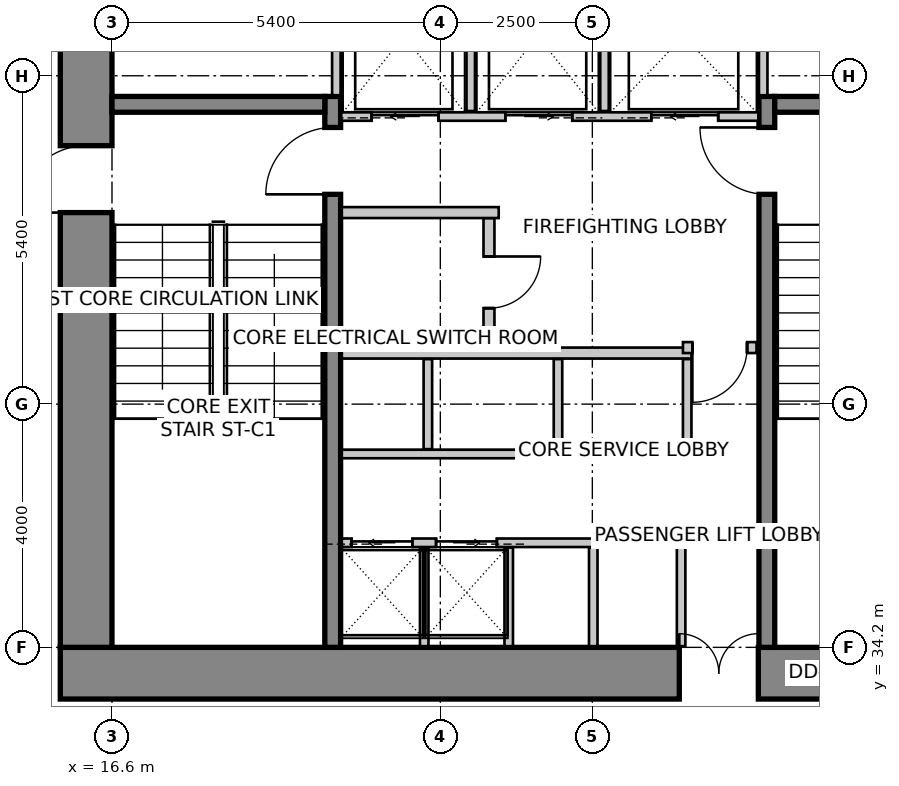
"""IFC4 building model, lengths in metres.
Left out: names, types, materials, properties, quantities, classifications, styles, units other than length and angle.
Written with IfcOpenShell. Run it as: python <this file> out.ifc"""

import sys

from ifc_helpers import new_model, si_unit, direction, frame, frame_2d, origin, place, context, subcontext, project, spatial, rectangle, extrude, source, transform, mapped, element, fill, save


model = new_model("IFC4")
c1 = context("Model", 3, precision=1e-05, world=origin(), true_north=direction((0.0, 1.0)))
c2 = subcontext(c1, "Body", "Model", "MODEL_VIEW")
j1 = project(units=[si_unit("LENGTHUNIT", "METRE"), si_unit("PLANEANGLEUNIT", "RADIAN")], contexts=[c1])
p1 = place(None, origin())
s1 = spatial("IfcSite", under=j1, at=p1, CompositionType="ELEMENT")
p2 = place(p1, origin())
s2 = spatial("IfcBuilding", under=s1, at=p2, CompositionType="ELEMENT")
p3 = place(p2, frame((0.0, 0.0, 39.0)))
s3 = spatial("IfcBuildingStorey", under=s2, at=p3, CompositionType="ELEMENT", Elevation=39.0)
p4 = place(p3, frame((15.75, 33.775, 0.0), z_axis=(0.0, 0.0, 1.0), x_axis=(1.0, 0.0, 0.0)))
e1 = element("IfcWall", 1, at=p4, inside=s3, PredefinedType="SHEAR", context=c2, shape_type="SweptSolid", body=[
    extrude(rectangle(XDim=16.1, YDim=0.85, at=frame_2d((8.05, 0.0))), origin(), (0.0, 0.0, 1.0), 4.0),
])
m1 = source(origin(), c2, "Body", "SweptSolid", [
    extrude(rectangle(XDim=1.3, YDim=2.15, at=frame_2d((0.65, 1.075))), frame((0.0, 0.435, 0.0), z_axis=(0.0, -1.0, 0.0), x_axis=(1.0, 0.0, 0.0)), (0.0, 0.0, 1.0), 0.87),
])
p5 = place(p4, frame((10.18, 0.0, 0.0)))
e2 = element("IfcOpeningElement", 2, at=p5, cuts=e1, PredefinedType="OPENING", context=c2, shape_type="MappedRepresentation", body=[
    mapped(m1, transform((0.0, 0.0, 0.0), scale=1.0)),
])
p6 = place(p3, frame((16.175, 34.2, 0.0), z_axis=(0.0, 0.0, 1.0), x_axis=(0.0, 1.0, 0.0)))
e3 = element("IfcWall", 3, at=p6, inside=s3, PredefinedType="SHEAR", context=c2, shape_type="SweptSolid", body=[
    extrude(rectangle(XDim=11.4, YDim=0.85, at=frame_2d((5.7, 0.0))), origin(), (0.0, 0.0, 1.0), 4.0),
])
m2 = source(origin(), c2, "Body", "SweptSolid", [
    extrude(rectangle(XDim=1.1, YDim=2.15, at=frame_2d((0.55, 1.075))), frame((0.0, 0.435, 0.0), z_axis=(0.0, -1.0, 0.0), x_axis=(1.0, 0.0, 0.0)), (0.0, 0.0, 1.0), 0.87),
])
p7 = place(p6, frame((7.15, 0.0, 0.0)))
e4 = element("IfcOpeningElement", 4, at=p7, cuts=e3, PredefinedType="OPENING", context=c2, shape_type="MappedRepresentation", body=[
    mapped(m2, transform((0.0, 0.0, 0.0), scale=1.0)),
])
p8 = place(p3, frame((20.23, 34.2, 0.0), z_axis=(0.0, 0.0, 1.0), x_axis=(0.0, 1.0, 0.0)))
e5 = element("IfcWall", 5, at=p8, inside=s3, PredefinedType="SHEAR", context=c2, shape_type="SweptSolid", body=[
    extrude(rectangle(XDim=9.06, YDim=0.26, at=frame_2d((4.53, 0.0))), origin(), (0.0, 0.0, 1.0), 4.0),
])
m3 = source(origin(), c2, "Body", "SweptSolid", [
    extrude(rectangle(XDim=1.1, YDim=2.15, at=frame_2d((0.55, 1.075))), frame((0.0, 0.14, 0.0), z_axis=(0.0, -1.0, 0.0), x_axis=(1.0, 0.0, 0.0)), (0.0, 0.0, 1.0), 0.28),
])
p9 = place(p8, frame((7.45, 0.0, 0.0)))
e6 = element("IfcOpeningElement", 6, at=p9, cuts=e5, PredefinedType="OPENING", context=c2, shape_type="MappedRepresentation", body=[
    mapped(m3, transform((0.0, 0.0, 0.0), scale=1.0)),
])
p10 = place(p3, frame((27.37, 34.2, 0.0), z_axis=(0.0, 0.0, 1.0), x_axis=(0.0, 1.0, 0.0)))
e7 = element("IfcWall", 7, at=p10, inside=s3, PredefinedType="SHEAR", context=c2, shape_type="SweptSolid", body=[
    extrude(rectangle(XDim=9.06, YDim=0.26, at=frame_2d((4.53, 0.0))), origin(), (0.0, 0.0, 1.0), 4.0),
])
p11 = place(p10, frame((7.45, 0.0, 0.0)))
e8 = element("IfcOpeningElement", 8, at=p11, cuts=e7, PredefinedType="OPENING", context=c2, shape_type="MappedRepresentation", body=[
    mapped(m3, transform((0.0, 0.0, 0.0), scale=1.0)),
])
for number, where, z_axis, x_axis in (
    (9, (16.6, 43.13, 0.0), (0.0, 0.0, 1.0), (1.0, 0.0, 0.0)),
    (10, (27.5, 43.13, 0.0), (0.0, 0.0, 1.0), (1.0, 0.0, 0.0)),
):
    element("IfcWall", number, at=place(p3, frame(where, z_axis=z_axis, x_axis=x_axis)), inside=s3, PredefinedType="SHEAR", context=c2, shape_type="SweptSolid", body=[
        extrude(rectangle(XDim=3.5, YDim=0.26, at=frame_2d((1.75, 0.0))), origin(), (0.0, 0.0, 1.0), 4.0),
    ])
p12 = place(p3, frame((20.37, 42.93, 0.0), z_axis=(0.0, 0.0, 1.0), x_axis=(1.0, 0.0, 0.0)))
e11 = element("IfcWall", 11, at=p12, inside=s3, PredefinedType="SOLIDWALL", context=c2, shape_type="SweptSolid", body=[
    extrude(rectangle(XDim=6.86, YDim=0.14, at=frame_2d((3.43, 0.0))), origin(), (0.0, 0.0, 1.0), 3.75),
])
m4 = source(origin(), c2, "Body", "SweptSolid", [
    extrude(rectangle(XDim=1.1, YDim=2.15, at=frame_2d((0.55, 1.075))), frame((0.0, 0.08, 0.0), z_axis=(0.0, -1.0, 0.0), x_axis=(1.0, 0.0, 0.0)), (0.0, 0.0, 1.0), 0.16),
])
p13 = place(p12, frame((0.5, 0.0, 0.0)))
e12 = element("IfcOpeningElement", 12, at=p13, cuts=e11, PredefinedType="OPENING", context=c2, shape_type="MappedRepresentation", body=[
    mapped(m4, transform((0.0, 0.0, 0.0), scale=1.0)),
])
p14 = place(p12, frame((2.7, 0.0, 0.0)))
e13 = element("IfcOpeningElement", 13, at=p14, cuts=e11, PredefinedType="OPENING", context=c2, shape_type="MappedRepresentation", body=[
    mapped(m4, transform((0.0, 0.0, 0.0), scale=1.0)),
])
p15 = place(p12, frame((5.1, 0.0, 0.0)))
e14 = element("IfcOpeningElement", 14, at=p15, cuts=e11, PredefinedType="OPENING", context=c2, shape_type="MappedRepresentation", body=[
    mapped(m4, transform((0.0, 0.0, 0.0), scale=1.0)),
])
for number, where, z_axis, x_axis in (
    (15, (20.29, 43.28, 0.0), (0.0, 0.0, 1.0), (0.0, 1.0, 0.0)),
    (16, (27.31, 43.28, 0.0), (0.0, 0.0, 1.0), (0.0, 1.0, 0.0)),
):
    element("IfcWall", number, at=place(p3, frame(where, z_axis=z_axis, x_axis=x_axis)), inside=s3, PredefinedType="SOLIDWALL", context=c2, shape_type="SweptSolid", body=[
        extrude(rectangle(XDim=2.3, YDim=0.14, at=frame_2d((1.15, 0.0))), origin(), (0.0, 0.0, 1.0), 3.75),
    ])
for number, where, z_axis, x_axis in (
    (17, (22.5, 43.02, 0.0), (0.0, 0.0, 1.0), (0.0, 1.0, 0.0)),
    (18, (24.7, 43.02, 0.0), (0.0, 0.0, 1.0), (0.0, 1.0, 0.0)),
):
    element("IfcWall", number, at=place(p3, frame(where, z_axis=z_axis, x_axis=x_axis)), inside=s3, PredefinedType="SOLIDWALL", context=c2, shape_type="SweptSolid", body=[
        extrude(rectangle(XDim=2.56, YDim=0.14, at=frame_2d((1.28, 0.0))), origin(), (0.0, 0.0, 1.0), 3.75),
    ])
p16 = place(p3, frame((20.38, 35.92, 0.0), z_axis=(0.0, 0.0, 1.0), x_axis=(1.0, 0.0, 0.0)))
e19 = element("IfcWall", 19, at=p16, inside=s3, PredefinedType="SOLIDWALL", context=c2, shape_type="SweptSolid", body=[
    extrude(rectangle(XDim=5.65, YDim=0.14, at=frame_2d((2.825, 0.0))), origin(), (0.0, 0.0, 1.0), 3.75),
])
m5 = source(origin(), c2, "Body", "SweptSolid", [
    extrude(rectangle(XDim=1.0, YDim=2.15, at=frame_2d((0.5, 1.075))), frame((0.0, 0.08, 0.0), z_axis=(0.0, -1.0, 0.0), x_axis=(1.0, 0.0, 0.0)), (0.0, 0.0, 1.0), 0.16),
])
p17 = place(p16, frame((0.16, 0.0, 0.0)))
e20 = element("IfcOpeningElement", 20, at=p17, cuts=e19, PredefinedType="OPENING", context=c2, shape_type="MappedRepresentation", body=[
    mapped(m5, transform((0.0, 0.0, 0.0), scale=1.0)),
])
p18 = place(p16, frame((1.55, 0.0, 0.0)))
e21 = element("IfcOpeningElement", 21, at=p18, cuts=e19, PredefinedType="OPENING", context=c2, shape_type="MappedRepresentation", body=[
    mapped(m5, transform((0.0, 0.0, 0.0), scale=1.0)),
])
for number, where, z_axis, x_axis in (
    (22, (25.96, 34.22, 0.0), (0.0, 0.0, 1.0), (0.0, 1.0, 0.0)),
    (23, (21.735, 34.22, 0.0), (0.0, 0.0, 1.0), (0.0, 1.0, 0.0)),
    (24, (23.125, 34.22, 0.0), (0.0, 0.0, 1.0), (0.0, 1.0, 0.0)),
    (25, (24.515, 34.22, 0.0), (0.0, 0.0, 1.0), (0.0, 1.0, 0.0)),
):
    element("IfcWall", number, at=place(p3, frame(where, z_axis=z_axis, x_axis=x_axis)), inside=s3, PredefinedType="SOLIDWALL", context=c2, shape_type="SweptSolid", body=[
        extrude(rectangle(XDim=1.62, YDim=0.14, at=frame_2d((0.81, 0.0))), origin(), (0.0, 0.0, 1.0), 3.042),
    ])
p19 = place(p3, frame((20.38, 37.38, 0.0), z_axis=(0.0, 0.0, 1.0), x_axis=(1.0, 0.0, 0.0)))
e26 = element("IfcWall", 26, at=p19, inside=s3, PredefinedType="SOLIDWALL", context=c2, shape_type="SweptSolid", body=[
    extrude(rectangle(XDim=5.75, YDim=0.14, at=frame_2d((2.875, 0.0))), origin(), (0.0, 0.0, 1.0), 3.75),
])
p20 = place(p3, frame((20.38, 39.04, 0.0), z_axis=(0.0, 0.0, 1.0), x_axis=(1.0, 0.0, 0.0)))
e27 = element("IfcWall", 27, at=p20, inside=s3, PredefinedType="SOLIDWALL", context=c2, shape_type="SweptSolid", body=[
    extrude(rectangle(XDim=5.75, YDim=0.18, at=frame_2d((2.875, 0.0))), origin(), (0.0, 0.0, 1.0), 3.75),
])
for number, where, z_axis, x_axis in (
    (28, (26.06, 37.46, 0.0), (0.0, 0.0, 1.0), (0.0, 1.0, 0.0)),
    (29, (21.795, 37.46, 0.0), (0.0, 0.0, 1.0), (0.0, 1.0, 0.0)),
    (30, (23.935, 37.46, 0.0), (0.0, 0.0, 1.0), (0.0, 1.0, 0.0)),
):
    element("IfcWall", number, at=place(p3, frame(where, z_axis=z_axis, x_axis=x_axis)), inside=s3, PredefinedType="SOLIDWALL", context=c2, shape_type="SweptSolid", body=[
        extrude(rectangle(XDim=1.48, YDim=0.14, at=frame_2d((0.74, 0.0))), origin(), (0.0, 0.0, 1.0), 3.75),
    ])
p21 = place(p3, frame((22.96, 41.35, 0.0), z_axis=(0.0, 0.0, 1.0), x_axis=(-1.0, 0.0, 0.0)))
e31 = element("IfcWall", 31, at=p21, inside=s3, PredefinedType="PARTITIONING", context=c2, shape_type="SweptSolid", body=[
    extrude(rectangle(XDim=2.58, YDim=0.18, at=frame_2d((1.29, 0.0))), origin(), (0.0, 0.0, 1.0), 3.75),
])
p22 = place(p3, frame((22.8, 41.256, 0.0), z_axis=(0.0, 0.0, 1.0), x_axis=(0.0, -1.0, 0.0)))
e32 = element("IfcWall", 32, at=p22, inside=s3, PredefinedType="PARTITIONING", context=c2, shape_type="SweptSolid", body=[
    extrude(rectangle(XDim=2.106, YDim=0.18, at=frame_2d((1.053, 0.0))), origin(), (0.0, 0.0, 1.0), 3.75),
])
m6 = source(origin(), c2, "Body", "SweptSolid", [
    extrude(rectangle(XDim=0.85, YDim=2.15, at=frame_2d((0.425, 1.075))), frame((0.0, 0.1, 0.0), z_axis=(0.0, -1.0, 0.0), x_axis=(1.0, 0.0, 0.0)), (0.0, 0.0, 1.0), 0.2),
])
p23 = place(p22, frame((0.628, 0.0, 0.0)))
e33 = element("IfcOpeningElement", 33, at=p23, cuts=e32, PredefinedType="OPENING", context=c2, shape_type="MappedRepresentation", body=[
    mapped(m6, transform((0.0, 0.0, 0.0), scale=1.0)),
])
p24 = place(p3, frame((27.2, 39.13, 0.0), z_axis=(0.0, 0.0, 1.0), x_axis=(-1.0, 0.0, 0.0)))
e34 = element("IfcWall", 34, at=p24, inside=s3, PredefinedType="PARTITIONING", context=c2, shape_type="SweptSolid", body=[
    extrude(rectangle(XDim=1.21, YDim=0.18, at=frame_2d((0.605, 0.0))), origin(), (0.0, 0.0, 1.0), 3.75),
])
m7 = source(origin(), c2, "Body", "SweptSolid", [
    extrude(rectangle(XDim=0.9, YDim=2.15, at=frame_2d((0.45, 1.075))), frame((0.0, 0.1, 0.0), z_axis=(0.0, -1.0, 0.0), x_axis=(1.0, 0.0, 0.0)), (0.0, 0.0, 1.0), 0.2),
])
p25 = place(p24, frame((0.155, 0.0, 0.0)))
e35 = element("IfcOpeningElement", 35, at=p25, cuts=e34, PredefinedType="OPENING", context=c2, shape_type="MappedRepresentation", body=[
    mapped(m7, transform((0.0, 0.0, 0.0), scale=1.0)),
])
m8 = source(origin(), c2, "Body", "SweptSolid", [
    extrude(rectangle(XDim=1.1, YDim=2.15, at=frame_2d((0.55, 1.075))), frame((0.0, 0.025, 0.0), z_axis=(0.0, -1.0, 0.0), x_axis=(1.0, 0.0, 0.0)), (0.0, 0.0, 1.0), 0.05),
])
p26 = place(p13, origin())
e36 = element("IfcDoor", 36, at=p26, inside=s3, OperationType="SLIDING_TO_LEFT", PredefinedType="DOOR", context=c2, shape_type="MappedRepresentation", body=[
    mapped(m8, transform((0.0, 0.0, 0.0), scale=1.0)),
])
fill(e12, e36)
p27 = place(p14, origin())
e37 = element("IfcDoor", 37, at=p27, inside=s3, OperationType="SLIDING_TO_RIGHT", PredefinedType="DOOR", context=c2, shape_type="MappedRepresentation", body=[
    mapped(m8, transform((0.0, 0.0, 0.0), scale=1.0)),
])
fill(e13, e37)
m9 = source(origin(), c2, "Body", "SweptSolid", [
    extrude(rectangle(XDim=1.1, YDim=2.15, at=frame_2d((0.55, 1.075))), frame((0.0, 0.025, 0.0), z_axis=(0.0, -1.0, 0.0), x_axis=(1.0, 0.0, 0.0)), (0.0, 0.0, 1.0), 0.05),
])
p28 = place(p15, origin())
e38 = element("IfcDoor", 38, at=p28, inside=s3, OperationType="SLIDING_TO_LEFT", PredefinedType="DOOR", context=c2, shape_type="MappedRepresentation", body=[
    mapped(m9, transform((0.0, 0.0, 0.0), scale=1.0)),
])
fill(e14, e38)
m10 = source(origin(), c2, "Body", "SweptSolid", [
    extrude(rectangle(XDim=1.0, YDim=2.15, at=frame_2d((0.5, 1.075))), frame((0.0, 0.025, 0.0), z_axis=(0.0, -1.0, 0.0), x_axis=(1.0, 0.0, 0.0)), (0.0, 0.0, 1.0), 0.05),
])
p29 = place(p17, origin())
e39 = element("IfcDoor", 39, at=p29, inside=s3, OperationType="SLIDING_TO_LEFT", PredefinedType="DOOR", context=c2, shape_type="MappedRepresentation", body=[
    mapped(m10, transform((0.0, 0.0, 0.0), scale=1.0)),
])
fill(e20, e39)
p30 = place(p18, origin())
e40 = element("IfcDoor", 40, at=p30, inside=s3, OperationType="SLIDING_TO_RIGHT", PredefinedType="DOOR", context=c2, shape_type="MappedRepresentation", body=[
    mapped(m10, transform((0.0, 0.0, 0.0), scale=1.0)),
])
fill(e21, e40)
m11 = source(origin(), c2, "Body", "SweptSolid", [
    extrude(rectangle(XDim=1.1, YDim=2.15, at=frame_2d((0.55, 1.075))), frame((0.0, 0.025, 0.0), z_axis=(0.0, -1.0, 0.0), x_axis=(1.0, 0.0, 0.0)), (0.0, 0.0, 1.0), 0.05),
])
p31 = place(p9, origin())
e41 = element("IfcDoor", 41, at=p31, inside=s3, OperationType="SINGLE_SWING_LEFT", PredefinedType="DOOR", context=c2, shape_type="MappedRepresentation", body=[
    mapped(m11, transform((0.0, 0.0, 0.0), scale=1.0)),
])
fill(e6, e41)
p32 = place(p11, origin())
e42 = element("IfcDoor", 42, at=p32, inside=s3, OperationType="SINGLE_SWING_RIGHT", PredefinedType="DOOR", context=c2, shape_type="MappedRepresentation", body=[
    mapped(m11, transform((0.0, 0.0, 0.0), scale=1.0)),
])
fill(e8, e42)
p33 = place(p7, origin())
e43 = element("IfcDoor", 43, at=p33, inside=s3, OperationType="SINGLE_SWING_LEFT", PredefinedType="DOOR", context=c2, shape_type="MappedRepresentation", body=[
    mapped(m11, transform((0.0, 0.0, 0.0), scale=1.0)),
])
fill(e4, e43)
m12 = source(origin(), c2, "Body", "SweptSolid", [
    extrude(rectangle(XDim=1.3, YDim=2.15, at=frame_2d((0.65, 1.075))), frame((0.0, 0.025, 0.0), z_axis=(0.0, -1.0, 0.0), x_axis=(1.0, 0.0, 0.0)), (0.0, 0.0, 1.0), 0.05),
])
p34 = place(p5, origin())
e44 = element("IfcDoor", 44, at=p34, inside=s3, OperationType="DOUBLE_DOOR_SINGLE_SWING", PredefinedType="DOOR", context=c2, shape_type="MappedRepresentation", body=[
    mapped(m12, transform((0.0, 0.0, 0.0), scale=1.0)),
])
fill(e2, e44)
m13 = source(origin(), c2, "Body", "SweptSolid", [
    extrude(rectangle(XDim=0.85, YDim=2.15, at=frame_2d((0.425, 1.075))), frame((0.0, 0.025, 0.0), z_axis=(0.0, -1.0, 0.0), x_axis=(1.0, 0.0, 0.0)), (0.0, 0.0, 1.0), 0.05),
])
p35 = place(p23, origin())
e45 = element("IfcDoor", 45, at=p35, inside=s3, OperationType="SINGLE_SWING_LEFT", PredefinedType="DOOR", context=c2, shape_type="MappedRepresentation", body=[
    mapped(m13, transform((0.0, 0.0, 0.0), scale=1.0)),
])
fill(e33, e45)
m14 = source(origin(), c2, "Body", "SweptSolid", [
    extrude(rectangle(XDim=0.9, YDim=2.15, at=frame_2d((0.45, 1.075))), frame((0.0, 0.025, 0.0), z_axis=(0.0, -1.0, 0.0), x_axis=(1.0, 0.0, 0.0)), (0.0, 0.0, 1.0), 0.05),
])
p36 = place(p25, origin())
e46 = element("IfcDoor", 46, at=p36, inside=s3, OperationType="SINGLE_SWING_RIGHT", PredefinedType="DOOR", context=c2, shape_type="MappedRepresentation", body=[
    mapped(m14, transform((0.0, 0.0, 0.0), scale=1.0)),
])
fill(e35, e46)
save(model, sys.argv[1])
